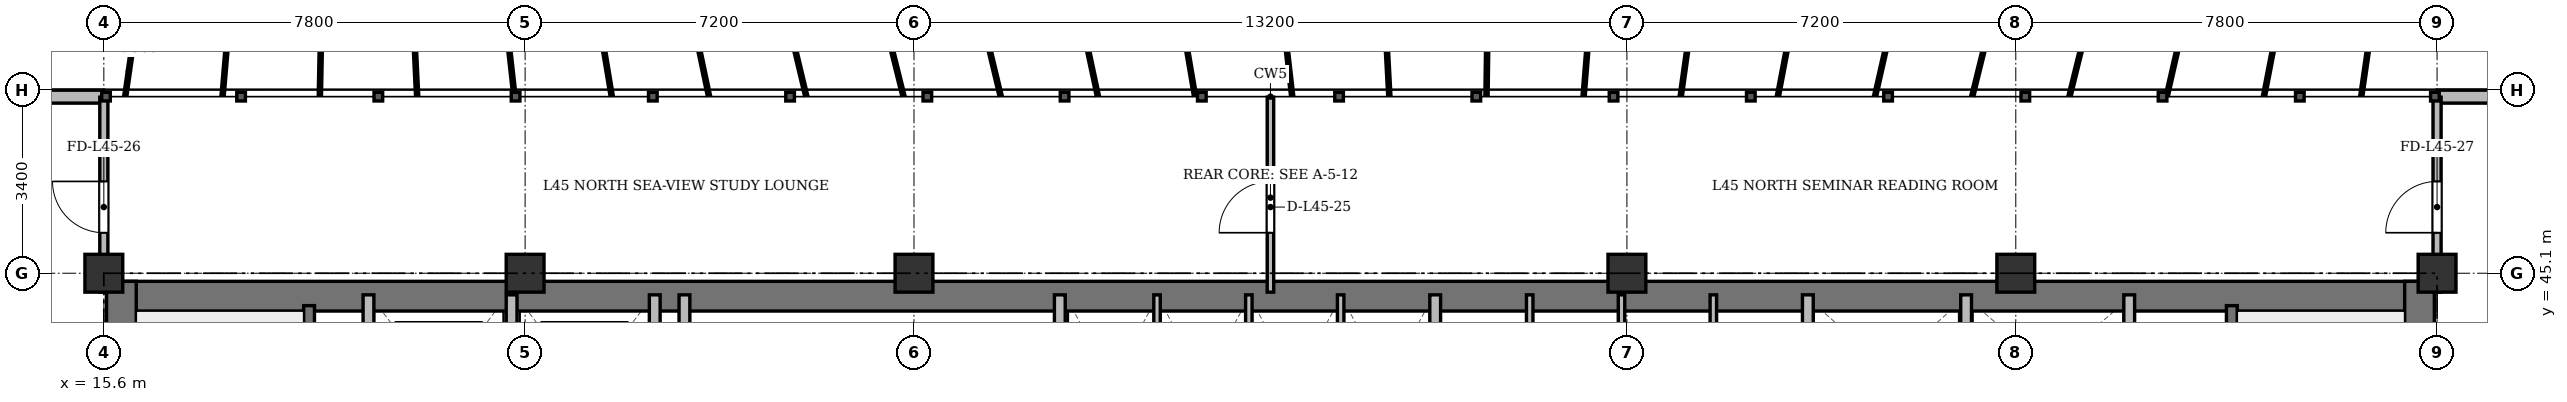
"""IFC4 building model, lengths in metres.
Left out: names, types, materials, properties, quantities, classifications, styles, units other than length and angle.
Written with IfcOpenShell. Run it as: python <this file> out.ifc"""

import sys

from ifc_helpers import new_model, si_unit, direction, frame, frame_2d, origin, origin_2d, place, context, subcontext, project, spatial, rectangle, extrude, source, transform, mapped, element, fill, save


model = new_model("IFC4")
c1 = context("Model", 3, precision=1e-05, world=origin(), true_north=direction((0.0, 1.0)))
c2 = subcontext(c1, "Body", "Model", "MODEL_VIEW")
j1 = project(units=[si_unit("LENGTHUNIT", "METRE"), si_unit("PLANEANGLEUNIT", "RADIAN")], contexts=[c1])
p1 = place(None, origin())
s1 = spatial("IfcSite", under=j1, at=p1, CompositionType="ELEMENT")
p2 = place(p1, origin())
s2 = spatial("IfcBuilding", under=s1, at=p2, CompositionType="ELEMENT")
p3 = place(p2, frame((0.0, 0.0, 171.7)))
s3 = spatial("IfcBuildingStorey", under=s2, at=p3, CompositionType="ELEMENT", Elevation=171.7)
m1 = source(origin(), c2, "Body", "SweptSolid", [
    extrude(rectangle(XDim=0.7, YDim=0.7, at=origin_2d()), origin(), (0.0, 0.0, 1.0), 3.6),
])
for number, where, z_axis, x_axis in (
    (1, (15.6, 45.1, 0.0), (0.0, 0.0, 1.0), (1.0, 0.0, 0.0)),
    (2, (23.4, 45.1, 0.0), (0.0, 0.0, 1.0), (1.0, 0.0, 0.0)),
    (3, (30.6, 45.1, 0.0), (0.0, 0.0, 1.0), (1.0, 0.0, 0.0)),
    (4, (43.8, 45.1, 0.0), (0.0, 0.0, 1.0), (1.0, 0.0, 0.0)),
    (5, (51.0, 45.1, 0.0), (0.0, 0.0, 1.0), (1.0, 0.0, 0.0)),
    (6, (58.8, 45.1, 0.0), (0.0, 0.0, 1.0), (1.0, 0.0, 0.0)),
):
    element("IfcColumn", number, at=place(p3, frame(where, z_axis=z_axis, x_axis=x_axis)), inside=s3, PredefinedType="COLUMN", context=c2, shape_type="MappedRepresentation", body=[
        mapped(m1, transform((0.0, 0.0, 0.0), x_axis=(1.0, 0.0, 0.0), y_axis=(0.0, 1.0, 0.0), z_axis=(0.0, 0.0, 1.0), scale=1.0)),
    ])
p4 = place(p3, frame((10.9, 48.37, 0.0), z_axis=(0.0, 0.0, 1.0), x_axis=(1.0, 0.0, 0.0)))
e7 = element("IfcWall", 7, at=p4, inside=s3, PredefinedType="SOLIDWALL", context=c2, shape_type="SweptSolid", body=[
    extrude(rectangle(XDim=4.7, YDim=0.24, at=frame_2d((2.35, 0.0))), origin(), (0.0, 0.0, 1.0), 3.35),
])
p5 = place(p4, frame((2.057, 0.0, 0.9)))
e8 = element("IfcOpeningElement", 8, at=p5, cuts=e7, PredefinedType="OPENING", context=c2, shape_type="SweptSolid", body=[
    extrude(rectangle(XDim=1.35, YDim=1.5, at=frame_2d((0.675, 0.75))), frame((0.0, 0.13, 0.0), z_axis=(0.0, -1.0, 0.0), x_axis=(1.0, 0.0, 0.0)), (0.0, 0.0, 1.0), 0.26),
])
p6 = place(p3, frame((58.8, 48.37, 0.0), z_axis=(0.0, 0.0, 1.0), x_axis=(1.0, 0.0, 0.0)))
e9 = element("IfcWall", 9, at=p6, inside=s3, PredefinedType="SOLIDWALL", context=c2, shape_type="SweptSolid", body=[
    extrude(rectangle(XDim=4.7, YDim=0.24, at=frame_2d((2.35, 0.0))), origin(), (0.0, 0.0, 1.0), 3.35),
])
p7 = place(p6, frame((1.675, 0.0, 0.9)))
e10 = element("IfcOpeningElement", 10, at=p7, cuts=e9, PredefinedType="OPENING", context=c2, shape_type="SweptSolid", body=[
    extrude(rectangle(XDim=1.35, YDim=1.5, at=frame_2d((0.675, 0.75))), frame((0.0, 0.13, 0.0), z_axis=(0.0, -1.0, 0.0), x_axis=(1.0, 0.0, 0.0)), (0.0, 0.0, 1.0), 0.26),
])
p8 = place(p3, frame((15.65, 44.675, 0.0), z_axis=(0.0, 0.0, 1.0), x_axis=(1.0, 0.0, 0.0)))
e11 = element("IfcWall", 11, at=p8, inside=s3, PredefinedType="SHEAR", context=c2, shape_type="SweptSolid", body=[
    extrude(rectangle(XDim=43.1, YDim=0.55, at=frame_2d((21.55, 0.0))), origin(), (0.0, 0.0, 1.0), 3.35),
])
for number, where, z_axis, x_axis in (
    (12, (15.925, 33.4, 0.0), (0.0, 0.0, 1.0), (0.0, 1.0, 0.0)),
    (13, (58.475, 33.4, 0.0), (0.0, 0.0, 1.0), (0.0, 1.0, 0.0)),
):
    element("IfcWall", number, at=place(p3, frame(where, z_axis=z_axis, x_axis=x_axis)), inside=s3, PredefinedType="SHEAR", context=c2, shape_type="SweptSolid", body=[
        extrude(rectangle(XDim=11.55, YDim=0.55, at=frame_2d((5.775, 0.0))), origin(), (0.0, 0.0, 1.0), 3.35),
    ])
p9 = place(p3, frame((19.4, 33.4, 0.0), z_axis=(0.0, 0.0, 1.0), x_axis=(0.0, 1.0, 0.0)))
e14 = element("IfcWall", 14, at=p9, inside=s3, PredefinedType="SHEAR", context=c2, shape_type="SweptSolid", body=[
    extrude(rectangle(XDim=11.1, YDim=0.2, at=frame_2d((5.55, 0.0))), origin(), (0.0, 0.0, 1.0), 3.35),
])
p10 = place(p9, frame((0.85, 0.0, 0.0)))
e15 = element("IfcOpeningElement", 15, at=p10, cuts=e14, PredefinedType="OPENING", context=c2, shape_type="SweptSolid", body=[
    extrude(rectangle(XDim=1.1, YDim=2.15, at=frame_2d((0.55, 1.075))), frame((0.0, 0.11, 0.0), z_axis=(0.0, -1.0, 0.0), x_axis=(1.0, 0.0, 0.0)), (0.0, 0.0, 1.0), 0.22),
])
p11 = place(p3, frame((55.0, 33.4, 0.0), z_axis=(0.0, 0.0, 1.0), x_axis=(0.0, 1.0, 0.0)))
e16 = element("IfcWall", 16, at=p11, inside=s3, PredefinedType="SHEAR", context=c2, shape_type="SweptSolid", body=[
    extrude(rectangle(XDim=11.1, YDim=0.2, at=frame_2d((5.55, 0.0))), origin(), (0.0, 0.0, 1.0), 3.35),
])
p12 = place(p11, frame((0.85, 0.0, 0.0)))
e17 = element("IfcOpeningElement", 17, at=p12, cuts=e16, PredefinedType="OPENING", context=c2, shape_type="SweptSolid", body=[
    extrude(rectangle(XDim=1.1, YDim=2.15, at=frame_2d((0.55, 1.075))), frame((0.0, 0.11, 0.0), z_axis=(0.0, -1.0, 0.0), x_axis=(1.0, 0.0, 0.0)), (0.0, 0.0, 1.0), 0.22),
])
for number, where, z_axis, x_axis in (
    (18, (20.5, 41.3, 0.0), (0.0, 0.0, 1.0), (0.0, 1.0, 0.0)),
    (19, (23.15, 41.3, 0.0), (0.0, 0.0, 1.0), (0.0, 1.0, 0.0)),
    (20, (25.8, 41.3, 0.0), (0.0, 0.0, 1.0), (0.0, 1.0, 0.0)),
):
    element("IfcWall", number, at=place(p3, frame(where, z_axis=z_axis, x_axis=x_axis)), inside=s3, PredefinedType="SOLIDWALL", context=c2, shape_type="SweptSolid", body=[
        extrude(rectangle(XDim=3.4, YDim=0.2, at=frame_2d((1.7, 0.0))), origin(), (0.0, 0.0, 1.0), 3.35),
    ])
for number, where, z_axis, x_axis in (
    (21, (26.35, 33.4, 0.0), (0.0, 0.0, 1.0), (0.0, 1.0, 0.0)),
    (22, (33.3, 33.4, 0.0), (0.0, 0.0, 1.0), (0.0, 1.0, 0.0)),
):
    element("IfcWall", number, at=place(p3, frame(where, z_axis=z_axis, x_axis=x_axis)), inside=s3, PredefinedType="SOLIDWALL", context=c2, shape_type="SweptSolid", body=[
        extrude(rectangle(XDim=11.3, YDim=0.2, at=frame_2d((5.65, 0.0))), origin(), (0.0, 0.0, 1.0), 2.75),
    ])
for number, where, z_axis, x_axis in (
    (23, (35.1, 41.5, 0.0), (0.0, 0.0, 1.0), (0.0, 1.0, 0.0)),
    (24, (36.8, 41.5, 0.0), (0.0, 0.0, 1.0), (0.0, 1.0, 0.0)),
    (25, (38.5, 41.5, 0.0), (0.0, 0.0, 1.0), (0.0, 1.0, 0.0)),
):
    element("IfcWall", number, at=place(p3, frame(where, z_axis=z_axis, x_axis=x_axis)), inside=s3, PredefinedType="PARTITIONING", context=c2, shape_type="SweptSolid", body=[
        extrude(rectangle(XDim=3.2, YDim=0.12, at=frame_2d((1.6, 0.0))), origin(), (0.0, 0.0, 1.0), 3.35),
    ])
p13 = place(p3, frame((40.25, 41.5, 0.0), z_axis=(0.0, 0.0, 1.0), x_axis=(0.0, 1.0, 0.0)))
e26 = element("IfcWall", 26, at=p13, inside=s3, PredefinedType="SOLIDWALL", context=c2, shape_type="SweptSolid", body=[
    extrude(rectangle(XDim=3.2, YDim=0.2, at=frame_2d((1.6, 0.0))), origin(), (0.0, 0.0, 1.0), 3.35),
])
p14 = place(p3, frame((42.0, 41.5, 0.0), z_axis=(0.0, 0.0, 1.0), x_axis=(0.0, 1.0, 0.0)))
e27 = element("IfcWall", 27, at=p14, inside=s3, PredefinedType="PARTITIONING", context=c2, shape_type="SweptSolid", body=[
    extrude(rectangle(XDim=3.2, YDim=0.12, at=frame_2d((1.6, 0.0))), origin(), (0.0, 0.0, 1.0), 3.35),
])
p15 = place(p3, frame((43.7, 41.5, 0.0), z_axis=(0.0, 0.0, 1.0), x_axis=(0.0, 1.0, 0.0)))
e28 = element("IfcWall", 28, at=p15, inside=s3, PredefinedType="PARTITIONING", context=c2, shape_type="SweptSolid", body=[
    extrude(rectangle(XDim=3.2, YDim=0.12, at=frame_2d((1.6, 0.0))), origin(), (0.0, 0.0, 1.0), 2.85),
])
p16 = place(p3, frame((45.4, 41.5, 0.0), z_axis=(0.0, 0.0, 1.0), x_axis=(0.0, 1.0, 0.0)))
e29 = element("IfcWall", 29, at=p16, inside=s3, PredefinedType="PARTITIONING", context=c2, shape_type="SweptSolid", body=[
    extrude(rectangle(XDim=3.2, YDim=0.12, at=frame_2d((1.6, 0.0))), origin(), (0.0, 0.0, 1.0), 3.35),
])
p17 = place(p3, frame((47.15, 33.4, 0.0), z_axis=(0.0, 0.0, 1.0), x_axis=(0.0, 1.0, 0.0)))
e30 = element("IfcWall", 30, at=p17, inside=s3, PredefinedType="SOLIDWALL", context=c2, shape_type="SweptSolid", body=[
    extrude(rectangle(XDim=11.3, YDim=0.2, at=frame_2d((5.65, 0.0))), origin(), (0.0, 0.0, 1.0), 2.75),
])
for number, where, z_axis, x_axis in (
    (31, (50.08, 42.05, 0.0), (0.0, 0.0, 1.0), (0.0, 1.0, 0.0)),
    (32, (53.1, 42.05, 0.0), (0.0, 0.0, 1.0), (0.0, 1.0, 0.0)),
):
    element("IfcWall", number, at=place(p3, frame(where, z_axis=z_axis, x_axis=x_axis)), inside=s3, PredefinedType="SOLIDWALL", context=c2, shape_type="SweptSolid", body=[
        extrude(rectangle(XDim=2.65, YDim=0.2, at=frame_2d((1.325, 0.0))), origin(), (0.0, 0.0, 1.0), 3.35),
    ])
p18 = place(p3, frame((37.2, 44.75, 0.0), z_axis=(0.0, 0.0, 1.0), x_axis=(0.0, 1.0, 0.0)))
e33 = element("IfcWall", 33, at=p18, inside=s3, PredefinedType="PARTITIONING", context=c2, shape_type="SweptSolid", body=[
    extrude(rectangle(XDim=3.61, YDim=0.12, at=frame_2d((1.805, 0.0))), origin(), (0.0, 0.0, 1.0), 2.75),
])
p19 = place(p18, frame((1.1, 0.0, 0.0)))
e34 = element("IfcOpeningElement", 34, at=p19, cuts=e33, PredefinedType="OPENING", context=c2, shape_type="SweptSolid", body=[
    extrude(rectangle(XDim=0.95, YDim=2.15, at=frame_2d((0.475, 1.075))), frame((0.0, 0.07, 0.0), z_axis=(0.0, -1.0, 0.0), x_axis=(1.0, 0.0, 0.0)), (0.0, 0.0, 1.0), 0.14),
])
p20 = place(p3, frame((15.6, 44.75, 0.0), z_axis=(0.0, 0.0, 1.0), x_axis=(0.0, 1.0, 0.0)))
e35 = element("IfcWall", 35, at=p20, inside=s3, PredefinedType="PARTITIONING", context=c2, shape_type="SweptSolid", body=[
    extrude(rectangle(XDim=3.61, YDim=0.15, at=frame_2d((1.805, 0.0))), origin(), (0.0, 0.0, 1.0), 2.85),
])
p21 = place(p20, frame((1.1, 0.0, 0.0)))
e36 = element("IfcOpeningElement", 36, at=p21, cuts=e35, PredefinedType="OPENING", context=c2, shape_type="SweptSolid", body=[
    extrude(rectangle(XDim=0.95, YDim=2.15, at=frame_2d((0.475, 1.075))), frame((0.0, 0.085, 0.0), z_axis=(0.0, -1.0, 0.0), x_axis=(1.0, 0.0, 0.0)), (0.0, 0.0, 1.0), 0.17),
])
p22 = place(p3, frame((58.8, 44.75, 0.0), z_axis=(0.0, 0.0, 1.0), x_axis=(0.0, 1.0, 0.0)))
e37 = element("IfcWall", 37, at=p22, inside=s3, PredefinedType="PARTITIONING", context=c2, shape_type="SweptSolid", body=[
    extrude(rectangle(XDim=3.61, YDim=0.15, at=frame_2d((1.805, 0.0))), origin(), (0.0, 0.0, 1.0), 2.85),
])
p23 = place(p22, frame((1.1, 0.0, 0.0)))
e38 = element("IfcOpeningElement", 38, at=p23, cuts=e37, PredefinedType="OPENING", context=c2, shape_type="SweptSolid", body=[
    extrude(rectangle(XDim=0.95, YDim=2.15, at=frame_2d((0.475, 1.075))), frame((0.0, 0.085, 0.0), z_axis=(0.0, -1.0, 0.0), x_axis=(1.0, 0.0, 0.0)), (0.0, 0.0, 1.0), 0.17),
])
m2 = source(origin(), c2, "Body", "SweptSolid", [
    extrude(rectangle(XDim=0.95, YDim=2.15, at=frame_2d((0.475, 1.075))), frame((0.0, 0.025, 0.0), z_axis=(0.0, -1.0, 0.0), x_axis=(1.0, 0.0, 0.0)), (0.0, 0.0, 1.0), 0.05),
])
p24 = place(p19, origin())
e39 = element("IfcDoor", 39, at=p24, inside=s3, OperationType="SINGLE_SWING_LEFT", PredefinedType="DOOR", context=c2, shape_type="MappedRepresentation", body=[
    mapped(m2, transform((0.0, 0.0, 0.0), x_axis=(1.0, 0.0, 0.0), y_axis=(0.0, 1.0, 0.0), z_axis=(0.0, 0.0, 1.0), scale=1.0)),
])
fill(e34, e39)
p25 = place(p21, origin())
e40 = element("IfcDoor", 40, at=p25, inside=s3, OperationType="SINGLE_SWING_RIGHT", PredefinedType="DOOR", context=c2, shape_type="MappedRepresentation", body=[
    mapped(m2, transform((0.0, 0.0, 0.0), x_axis=(1.0, 0.0, 0.0), y_axis=(0.0, 1.0, 0.0), z_axis=(0.0, 0.0, 1.0), scale=1.0)),
])
fill(e36, e40)
p26 = place(p23, origin())
e41 = element("IfcDoor", 41, at=p26, inside=s3, OperationType="SINGLE_SWING_LEFT", PredefinedType="DOOR", context=c2, shape_type="MappedRepresentation", body=[
    mapped(m2, transform((0.0, 0.0, 0.0), x_axis=(1.0, 0.0, 0.0), y_axis=(0.0, 1.0, 0.0), z_axis=(0.0, 0.0, 1.0), scale=1.0)),
])
fill(e38, e41)
save(model, sys.argv[1])
